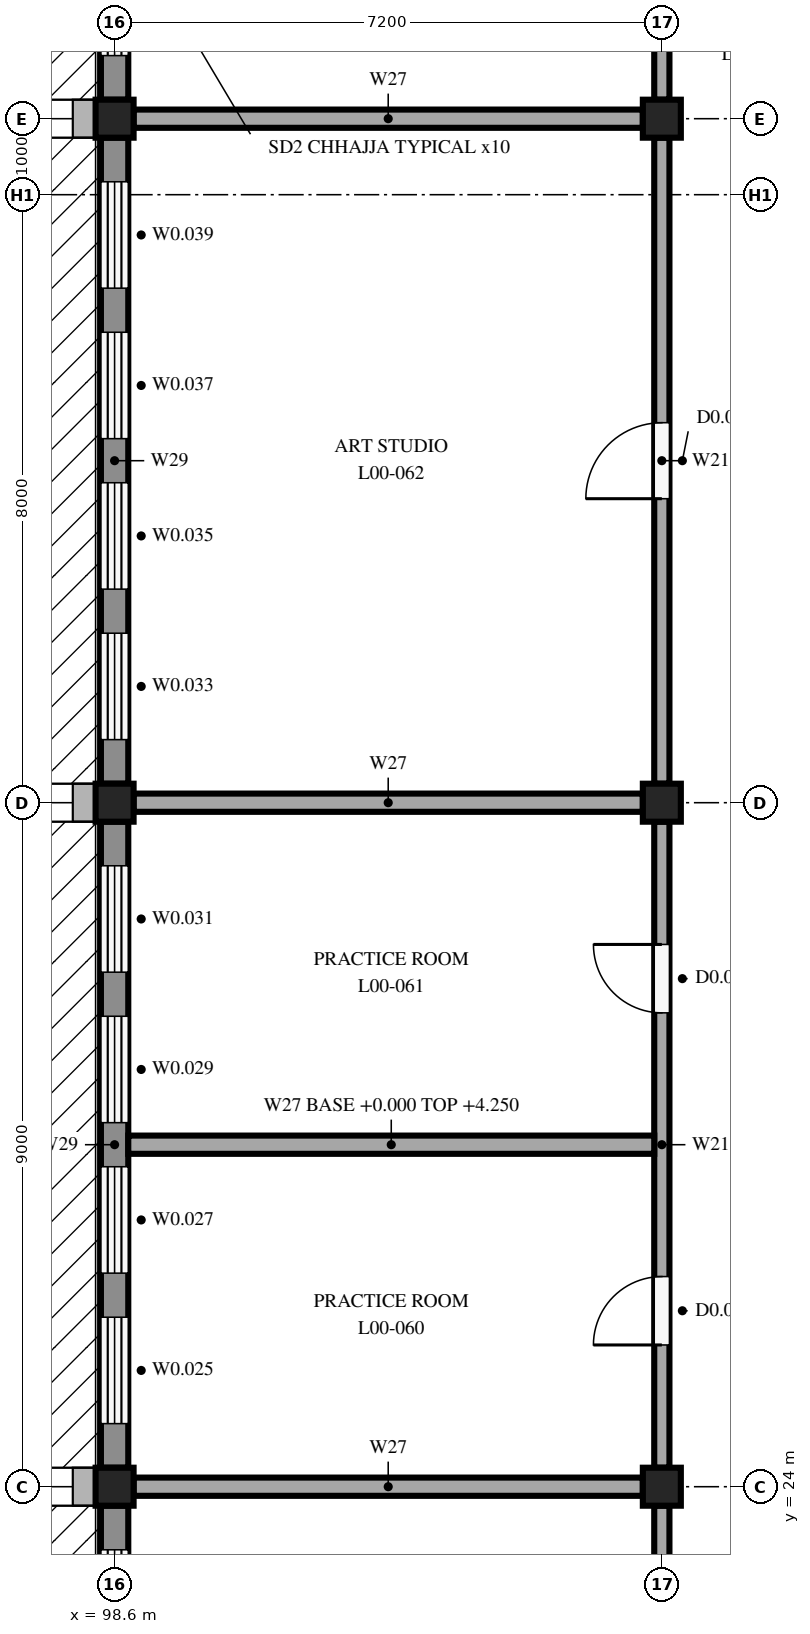
"""IFC4 building model, lengths in metres.
Left out: names, types, materials, properties, quantities, classifications, styles, units other than length and angle.
Written with IfcOpenShell. Run it as: python <this file> out.ifc"""

import sys

from ifc_helpers import new_model, si_unit, direction, frame, frame_2d, origin, origin_2d, place, context, subcontext, project, spatial, rectangle, extrude, element, fill, save


model = new_model("IFC4")
c1 = context("Model", 3, precision=1e-05, world=origin(), true_north=direction((0.0, 1.0)))
c2 = subcontext(c1, "Body", "Model", "MODEL_VIEW")
j1 = project(units=[si_unit("LENGTHUNIT", "METRE"), si_unit("PLANEANGLEUNIT", "RADIAN")], contexts=[c1])
p1 = place(None, origin())
s1 = spatial("IfcSite", under=j1, at=p1, CompositionType="ELEMENT")
p2 = place(p1, origin())
s2 = spatial("IfcBuilding", under=s1, at=p2, CompositionType="ELEMENT")
p3 = place(p2, origin())
s3 = spatial("IfcBuildingStorey", under=s2, at=p3, CompositionType="ELEMENT", Elevation=0.0)
for number, where, z_axis, x_axis in (
    (1, (98.6, 24.0, 0.0), (0.0, 0.0, 1.0), (1.0, 0.0, 0.0)),
    (2, (98.6, 33.0, 0.0), (0.0, 0.0, 1.0), (1.0, 0.0, 0.0)),
    (3, (98.6, 42.0, 0.0), (0.0, 0.0, 1.0), (1.0, 0.0, 0.0)),
    (4, (105.8, 24.0, 0.0), (0.0, 0.0, 1.0), (1.0, 0.0, 0.0)),
    (5, (105.8, 33.0, 0.0), (0.0, 0.0, 1.0), (1.0, 0.0, 0.0)),
    (6, (105.8, 42.0, 0.0), (0.0, 0.0, 1.0), (1.0, 0.0, 0.0)),
):
    element("IfcColumn", number, at=place(p3, frame(where, z_axis=z_axis, x_axis=x_axis)), inside=s3, PredefinedType="COLUMN", context=c2, shape_type="SweptSolid", body=[
        extrude(rectangle(XDim=0.5, YDim=0.5, at=origin_2d()), origin(), (0.0, 0.0, 1.0), 4.25),
    ])
p4 = place(p3, frame((98.6, 15.25, 0.0), z_axis=(0.0, 0.0, 1.0), x_axis=(0.0, 1.0, 0.0)))
e7 = element("IfcWall", 7, at=p4, inside=s3, PredefinedType="STANDARD", context=c2, shape_type="SweptSolid", body=[
    extrude(rectangle(XDim=8.5, YDim=0.36, at=frame_2d((4.25, 0.0))), origin(), (0.0, 0.0, 1.0), 3.75),
])
p5 = place(p4, frame((0.58, 0.0, 1.2)))
e8 = element("IfcOpeningElement", 8, at=p5, cuts=e7, PredefinedType="OPENING", context=c2, shape_type="SweptSolid", body=[
    extrude(rectangle(XDim=1.4, YDim=2.4, at=frame_2d((0.7, 1.2))), frame((0.0, 0.19, 0.0), z_axis=(0.0, -1.0, 0.0), x_axis=(1.0, 0.0, 0.0)), (0.0, 0.0, 1.0), 0.38),
])
p6 = place(p4, frame((2.56, 0.0, 1.2)))
e9 = element("IfcOpeningElement", 9, at=p6, cuts=e7, PredefinedType="OPENING", context=c2, shape_type="SweptSolid", body=[
    extrude(rectangle(XDim=1.4, YDim=2.4, at=frame_2d((0.7, 1.2))), frame((0.0, 0.19, 0.0), z_axis=(0.0, -1.0, 0.0), x_axis=(1.0, 0.0, 0.0)), (0.0, 0.0, 1.0), 0.38),
])
p7 = place(p4, frame((4.54, 0.0, 1.2)))
e10 = element("IfcOpeningElement", 10, at=p7, cuts=e7, PredefinedType="OPENING", context=c2, shape_type="SweptSolid", body=[
    extrude(rectangle(XDim=1.4, YDim=2.4, at=frame_2d((0.7, 1.2))), frame((0.0, 0.19, 0.0), z_axis=(0.0, -1.0, 0.0), x_axis=(1.0, 0.0, 0.0)), (0.0, 0.0, 1.0), 0.38),
])
p8 = place(p4, frame((6.52, 0.0, 1.2)))
e11 = element("IfcOpeningElement", 11, at=p8, cuts=e7, PredefinedType="OPENING", context=c2, shape_type="SweptSolid", body=[
    extrude(rectangle(XDim=1.4, YDim=2.4, at=frame_2d((0.7, 1.2))), frame((0.0, 0.19, 0.0), z_axis=(0.0, -1.0, 0.0), x_axis=(1.0, 0.0, 0.0)), (0.0, 0.0, 1.0), 0.38),
])
p9 = place(p3, frame((98.6, 24.25, 0.0), z_axis=(0.0, 0.0, 1.0), x_axis=(0.0, 1.0, 0.0)))
e12 = element("IfcWall", 12, at=p9, inside=s3, PredefinedType="STANDARD", context=c2, shape_type="SweptSolid", body=[
    extrude(rectangle(XDim=8.5, YDim=0.36, at=frame_2d((4.25, 0.0))), origin(), (0.0, 0.0, 1.0), 3.75),
])
p10 = place(p9, frame((0.58, 0.0, 1.2)))
e13 = element("IfcOpeningElement", 13, at=p10, cuts=e12, PredefinedType="OPENING", context=c2, shape_type="SweptSolid", body=[
    extrude(rectangle(XDim=1.4, YDim=2.4, at=frame_2d((0.7, 1.2))), frame((0.0, 0.19, 0.0), z_axis=(0.0, -1.0, 0.0), x_axis=(1.0, 0.0, 0.0)), (0.0, 0.0, 1.0), 0.38),
])
p11 = place(p9, frame((2.56, 0.0, 1.2)))
e14 = element("IfcOpeningElement", 14, at=p11, cuts=e12, PredefinedType="OPENING", context=c2, shape_type="SweptSolid", body=[
    extrude(rectangle(XDim=1.4, YDim=2.4, at=frame_2d((0.7, 1.2))), frame((0.0, 0.19, 0.0), z_axis=(0.0, -1.0, 0.0), x_axis=(1.0, 0.0, 0.0)), (0.0, 0.0, 1.0), 0.38),
])
p12 = place(p9, frame((4.54, 0.0, 1.2)))
e15 = element("IfcOpeningElement", 15, at=p12, cuts=e12, PredefinedType="OPENING", context=c2, shape_type="SweptSolid", body=[
    extrude(rectangle(XDim=1.4, YDim=2.4, at=frame_2d((0.7, 1.2))), frame((0.0, 0.19, 0.0), z_axis=(0.0, -1.0, 0.0), x_axis=(1.0, 0.0, 0.0)), (0.0, 0.0, 1.0), 0.38),
])
p13 = place(p9, frame((6.52, 0.0, 1.2)))
e16 = element("IfcOpeningElement", 16, at=p13, cuts=e12, PredefinedType="OPENING", context=c2, shape_type="SweptSolid", body=[
    extrude(rectangle(XDim=1.4, YDim=2.4, at=frame_2d((0.7, 1.2))), frame((0.0, 0.19, 0.0), z_axis=(0.0, -1.0, 0.0), x_axis=(1.0, 0.0, 0.0)), (0.0, 0.0, 1.0), 0.38),
])
p14 = place(p3, frame((98.6, 33.25, 0.0), z_axis=(0.0, 0.0, 1.0), x_axis=(0.0, 1.0, 0.0)))
e17 = element("IfcWall", 17, at=p14, inside=s3, PredefinedType="STANDARD", context=c2, shape_type="SweptSolid", body=[
    extrude(rectangle(XDim=8.5, YDim=0.36, at=frame_2d((4.25, 0.0))), origin(), (0.0, 0.0, 1.0), 3.75),
])
p15 = place(p14, frame((0.58, 0.0, 1.2)))
e18 = element("IfcOpeningElement", 18, at=p15, cuts=e17, PredefinedType="OPENING", context=c2, shape_type="SweptSolid", body=[
    extrude(rectangle(XDim=1.4, YDim=2.4, at=frame_2d((0.7, 1.2))), frame((0.0, 0.19, 0.0), z_axis=(0.0, -1.0, 0.0), x_axis=(1.0, 0.0, 0.0)), (0.0, 0.0, 1.0), 0.38),
])
p16 = place(p14, frame((2.56, 0.0, 1.2)))
e19 = element("IfcOpeningElement", 19, at=p16, cuts=e17, PredefinedType="OPENING", context=c2, shape_type="SweptSolid", body=[
    extrude(rectangle(XDim=1.4, YDim=2.4, at=frame_2d((0.7, 1.2))), frame((0.0, 0.19, 0.0), z_axis=(0.0, -1.0, 0.0), x_axis=(1.0, 0.0, 0.0)), (0.0, 0.0, 1.0), 0.38),
])
p17 = place(p14, frame((4.54, 0.0, 1.2)))
e20 = element("IfcOpeningElement", 20, at=p17, cuts=e17, PredefinedType="OPENING", context=c2, shape_type="SweptSolid", body=[
    extrude(rectangle(XDim=1.4, YDim=2.4, at=frame_2d((0.7, 1.2))), frame((0.0, 0.19, 0.0), z_axis=(0.0, -1.0, 0.0), x_axis=(1.0, 0.0, 0.0)), (0.0, 0.0, 1.0), 0.38),
])
p18 = place(p14, frame((6.52, 0.0, 1.2)))
e21 = element("IfcOpeningElement", 21, at=p18, cuts=e17, PredefinedType="OPENING", context=c2, shape_type="SweptSolid", body=[
    extrude(rectangle(XDim=1.4, YDim=2.4, at=frame_2d((0.7, 1.2))), frame((0.0, 0.19, 0.0), z_axis=(0.0, -1.0, 0.0), x_axis=(1.0, 0.0, 0.0)), (0.0, 0.0, 1.0), 0.38),
])
p19 = place(p3, frame((98.6, 42.25, 0.0), z_axis=(0.0, 0.0, 1.0), x_axis=(0.0, 1.0, 0.0)))
e22 = element("IfcWall", 22, at=p19, inside=s3, PredefinedType="STANDARD", context=c2, shape_type="SweptSolid", body=[
    extrude(rectangle(XDim=8.5, YDim=0.36, at=frame_2d((4.25, 0.0))), origin(), (0.0, 0.0, 1.0), 3.75),
])
p20 = place(p19, frame((0.58, 0.0, 1.2)))
e23 = element("IfcOpeningElement", 23, at=p20, cuts=e22, PredefinedType="OPENING", context=c2, shape_type="SweptSolid", body=[
    extrude(rectangle(XDim=1.4, YDim=2.4, at=frame_2d((0.7, 1.2))), frame((0.0, 0.19, 0.0), z_axis=(0.0, -1.0, 0.0), x_axis=(1.0, 0.0, 0.0)), (0.0, 0.0, 1.0), 0.38),
])
p21 = place(p19, frame((2.56, 0.0, 1.2)))
e24 = element("IfcOpeningElement", 24, at=p21, cuts=e22, PredefinedType="OPENING", context=c2, shape_type="SweptSolid", body=[
    extrude(rectangle(XDim=1.4, YDim=2.4, at=frame_2d((0.7, 1.2))), frame((0.0, 0.19, 0.0), z_axis=(0.0, -1.0, 0.0), x_axis=(1.0, 0.0, 0.0)), (0.0, 0.0, 1.0), 0.38),
])
p22 = place(p19, frame((4.54, 0.0, 1.2)))
e25 = element("IfcOpeningElement", 25, at=p22, cuts=e22, PredefinedType="OPENING", context=c2, shape_type="SweptSolid", body=[
    extrude(rectangle(XDim=1.4, YDim=2.4, at=frame_2d((0.7, 1.2))), frame((0.0, 0.19, 0.0), z_axis=(0.0, -1.0, 0.0), x_axis=(1.0, 0.0, 0.0)), (0.0, 0.0, 1.0), 0.38),
])
p23 = place(p19, frame((6.52, 0.0, 1.2)))
e26 = element("IfcOpeningElement", 26, at=p23, cuts=e22, PredefinedType="OPENING", context=c2, shape_type="SweptSolid", body=[
    extrude(rectangle(XDim=1.4, YDim=2.4, at=frame_2d((0.7, 1.2))), frame((0.0, 0.19, 0.0), z_axis=(0.0, -1.0, 0.0), x_axis=(1.0, 0.0, 0.0)), (0.0, 0.0, 1.0), 0.38),
])
p24 = place(p3, frame((105.8, 15.25, 0.0), z_axis=(0.0, 0.0, 1.0), x_axis=(0.0, 1.0, 0.0)))
e27 = element("IfcWall", 27, at=p24, inside=s3, PredefinedType="PARTITIONING", context=c2, shape_type="SweptSolid", body=[
    extrude(rectangle(XDim=8.5, YDim=0.2, at=frame_2d((4.25, 0.0))), origin(), (0.0, 0.0, 1.0), 3.8),
])
p25 = place(p24, frame((3.75, 0.0, 0.0)))
e28 = element("IfcOpeningElement", 28, at=p25, cuts=e27, PredefinedType="OPENING", context=c2, shape_type="SweptSolid", body=[
    extrude(rectangle(XDim=1.0, YDim=2.1, at=frame_2d((0.5, 1.05))), frame((0.0, 0.11, 0.0), z_axis=(0.0, -1.0, 0.0), x_axis=(1.0, 0.0, 0.0)), (0.0, 0.0, 1.0), 0.22),
])
p26 = place(p3, frame((105.8, 24.25, 0.0), z_axis=(0.0, 0.0, 1.0), x_axis=(0.0, 1.0, 0.0)))
e29 = element("IfcWall", 29, at=p26, inside=s3, PredefinedType="PARTITIONING", context=c2, shape_type="SweptSolid", body=[
    extrude(rectangle(XDim=8.5, YDim=0.2, at=frame_2d((4.25, 0.0))), origin(), (0.0, 0.0, 1.0), 3.8),
])
p27 = place(p26, frame((1.615, 0.0, 0.0)))
e30 = element("IfcOpeningElement", 30, at=p27, cuts=e29, PredefinedType="OPENING", context=c2, shape_type="SweptSolid", body=[
    extrude(rectangle(XDim=0.9, YDim=2.1, at=frame_2d((0.45, 1.05))), frame((0.0, 0.11, 0.0), z_axis=(0.0, -1.0, 0.0), x_axis=(1.0, 0.0, 0.0)), (0.0, 0.0, 1.0), 0.22),
])
p28 = place(p26, frame((5.985, 0.0, 0.0)))
e31 = element("IfcOpeningElement", 31, at=p28, cuts=e29, PredefinedType="OPENING", context=c2, shape_type="SweptSolid", body=[
    extrude(rectangle(XDim=0.9, YDim=2.1, at=frame_2d((0.45, 1.05))), frame((0.0, 0.11, 0.0), z_axis=(0.0, -1.0, 0.0), x_axis=(1.0, 0.0, 0.0)), (0.0, 0.0, 1.0), 0.22),
])
p29 = place(p3, frame((105.8, 33.25, 0.0), z_axis=(0.0, 0.0, 1.0), x_axis=(0.0, 1.0, 0.0)))
e32 = element("IfcWall", 32, at=p29, inside=s3, PredefinedType="PARTITIONING", context=c2, shape_type="SweptSolid", body=[
    extrude(rectangle(XDim=8.5, YDim=0.2, at=frame_2d((4.25, 0.0))), origin(), (0.0, 0.0, 1.0), 3.8),
])
p30 = place(p29, frame((3.75, 0.0, 0.0)))
e33 = element("IfcOpeningElement", 33, at=p30, cuts=e32, PredefinedType="OPENING", context=c2, shape_type="SweptSolid", body=[
    extrude(rectangle(XDim=1.0, YDim=2.1, at=frame_2d((0.5, 1.05))), frame((0.0, 0.11, 0.0), z_axis=(0.0, -1.0, 0.0), x_axis=(1.0, 0.0, 0.0)), (0.0, 0.0, 1.0), 0.22),
])
p31 = place(p3, frame((105.8, 42.25, 0.0), z_axis=(0.0, 0.0, 1.0), x_axis=(0.0, 1.0, 0.0)))
e34 = element("IfcWall", 34, at=p31, inside=s3, PredefinedType="PARTITIONING", context=c2, shape_type="SweptSolid", body=[
    extrude(rectangle(XDim=8.5, YDim=0.2, at=frame_2d((4.25, 0.0))), origin(), (0.0, 0.0, 1.0), 3.8),
])
p32 = place(p31, frame((3.75, 0.0, 0.0)))
e35 = element("IfcOpeningElement", 35, at=p32, cuts=e34, PredefinedType="OPENING", context=c2, shape_type="SweptSolid", body=[
    extrude(rectangle(XDim=1.0, YDim=2.1, at=frame_2d((0.5, 1.05))), frame((0.0, 0.11, 0.0), z_axis=(0.0, -1.0, 0.0), x_axis=(1.0, 0.0, 0.0)), (0.0, 0.0, 1.0), 0.22),
])
p33 = place(p3, frame((98.85, 24.0, 0.0), z_axis=(0.0, 0.0, 1.0), x_axis=(1.0, 0.0, 0.0)))
e36 = element("IfcWall", 36, at=p33, inside=s3, PredefinedType="PARTITIONING", context=c2, shape_type="SweptSolid", body=[
    extrude(rectangle(XDim=6.7, YDim=0.24, at=frame_2d((3.35, 0.0))), origin(), (0.0, 0.0, 1.0), 3.8),
])
p34 = place(p3, frame((98.78, 28.5, 0.0), z_axis=(0.0, 0.0, 1.0), x_axis=(1.0, 0.0, 0.0)))
e37 = element("IfcWall", 37, at=p34, inside=s3, PredefinedType="PARTITIONING", context=c2, shape_type="SweptSolid", body=[
    extrude(rectangle(XDim=6.92, YDim=0.24, at=frame_2d((3.46, 0.0))), origin(), (0.0, 0.0, 1.0), 4.25),
])
for number, where, z_axis, x_axis in (
    (38, (98.85, 33.0, 0.0), (0.0, 0.0, 1.0), (1.0, 0.0, 0.0)),
    (39, (98.85, 42.0, 0.0), (0.0, 0.0, 1.0), (1.0, 0.0, 0.0)),
):
    element("IfcWall", number, at=place(p3, frame(where, z_axis=z_axis, x_axis=x_axis)), inside=s3, PredefinedType="PARTITIONING", context=c2, shape_type="SweptSolid", body=[
        extrude(rectangle(XDim=6.7, YDim=0.24, at=frame_2d((3.35, 0.0))), origin(), (0.0, 0.0, 1.0), 3.8),
    ])
p35 = place(p8, origin())
e40 = element("IfcWindow", 40, at=p35, inside=s3, PartitioningType="DOUBLE_PANEL_VERTICAL", PredefinedType="WINDOW", context=c2, shape_type="SweptSolid", body=[
    extrude(rectangle(XDim=1.4, YDim=2.4, at=frame_2d((0.7, 1.2))), frame((0.0, 0.03, 0.0), z_axis=(0.0, -1.0, 0.0), x_axis=(1.0, 0.0, 0.0)), (0.0, 0.0, 1.0), 0.06),
])
fill(e11, e40)
p36 = place(p10, origin())
e41 = element("IfcWindow", 41, at=p36, inside=s3, PartitioningType="DOUBLE_PANEL_VERTICAL", PredefinedType="WINDOW", context=c2, shape_type="SweptSolid", body=[
    extrude(rectangle(XDim=1.4, YDim=2.4, at=frame_2d((0.7, 1.2))), frame((0.0, 0.03, 0.0), z_axis=(0.0, -1.0, 0.0), x_axis=(1.0, 0.0, 0.0)), (0.0, 0.0, 1.0), 0.06),
])
fill(e13, e41)
p37 = place(p11, origin())
e42 = element("IfcWindow", 42, at=p37, inside=s3, PartitioningType="DOUBLE_PANEL_VERTICAL", PredefinedType="WINDOW", context=c2, shape_type="SweptSolid", body=[
    extrude(rectangle(XDim=1.4, YDim=2.4, at=frame_2d((0.7, 1.2))), frame((0.0, 0.03, 0.0), z_axis=(0.0, -1.0, 0.0), x_axis=(1.0, 0.0, 0.0)), (0.0, 0.0, 1.0), 0.06),
])
fill(e14, e42)
p38 = place(p12, origin())
e43 = element("IfcWindow", 43, at=p38, inside=s3, PartitioningType="DOUBLE_PANEL_VERTICAL", PredefinedType="WINDOW", context=c2, shape_type="SweptSolid", body=[
    extrude(rectangle(XDim=1.4, YDim=2.4, at=frame_2d((0.7, 1.2))), frame((0.0, 0.03, 0.0), z_axis=(0.0, -1.0, 0.0), x_axis=(1.0, 0.0, 0.0)), (0.0, 0.0, 1.0), 0.06),
])
fill(e15, e43)
p39 = place(p13, origin())
e44 = element("IfcWindow", 44, at=p39, inside=s3, PartitioningType="DOUBLE_PANEL_VERTICAL", PredefinedType="WINDOW", context=c2, shape_type="SweptSolid", body=[
    extrude(rectangle(XDim=1.4, YDim=2.4, at=frame_2d((0.7, 1.2))), frame((0.0, 0.03, 0.0), z_axis=(0.0, -1.0, 0.0), x_axis=(1.0, 0.0, 0.0)), (0.0, 0.0, 1.0), 0.06),
])
fill(e16, e44)
p40 = place(p15, origin())
e45 = element("IfcWindow", 45, at=p40, inside=s3, PartitioningType="DOUBLE_PANEL_VERTICAL", PredefinedType="WINDOW", context=c2, shape_type="SweptSolid", body=[
    extrude(rectangle(XDim=1.4, YDim=2.4, at=frame_2d((0.7, 1.2))), frame((0.0, 0.03, 0.0), z_axis=(0.0, -1.0, 0.0), x_axis=(1.0, 0.0, 0.0)), (0.0, 0.0, 1.0), 0.06),
])
fill(e18, e45)
p41 = place(p16, origin())
e46 = element("IfcWindow", 46, at=p41, inside=s3, PartitioningType="DOUBLE_PANEL_VERTICAL", PredefinedType="WINDOW", context=c2, shape_type="SweptSolid", body=[
    extrude(rectangle(XDim=1.4, YDim=2.4, at=frame_2d((0.7, 1.2))), frame((0.0, 0.03, 0.0), z_axis=(0.0, -1.0, 0.0), x_axis=(1.0, 0.0, 0.0)), (0.0, 0.0, 1.0), 0.06),
])
fill(e19, e46)
p42 = place(p17, origin())
e47 = element("IfcWindow", 47, at=p42, inside=s3, PartitioningType="DOUBLE_PANEL_VERTICAL", PredefinedType="WINDOW", context=c2, shape_type="SweptSolid", body=[
    extrude(rectangle(XDim=1.4, YDim=2.4, at=frame_2d((0.7, 1.2))), frame((0.0, 0.03, 0.0), z_axis=(0.0, -1.0, 0.0), x_axis=(1.0, 0.0, 0.0)), (0.0, 0.0, 1.0), 0.06),
])
fill(e20, e47)
p43 = place(p18, origin())
e48 = element("IfcWindow", 48, at=p43, inside=s3, PartitioningType="DOUBLE_PANEL_VERTICAL", PredefinedType="WINDOW", context=c2, shape_type="SweptSolid", body=[
    extrude(rectangle(XDim=1.4, YDim=2.4, at=frame_2d((0.7, 1.2))), frame((0.0, 0.03, 0.0), z_axis=(0.0, -1.0, 0.0), x_axis=(1.0, 0.0, 0.0)), (0.0, 0.0, 1.0), 0.06),
])
fill(e21, e48)
p44 = place(p20, origin())
e49 = element("IfcWindow", 49, at=p44, inside=s3, PartitioningType="DOUBLE_PANEL_VERTICAL", PredefinedType="WINDOW", context=c2, shape_type="SweptSolid", body=[
    extrude(rectangle(XDim=1.4, YDim=2.4, at=frame_2d((0.7, 1.2))), frame((0.0, 0.03, 0.0), z_axis=(0.0, -1.0, 0.0), x_axis=(1.0, 0.0, 0.0)), (0.0, 0.0, 1.0), 0.06),
])
fill(e23, e49)
p45 = place(p27, origin())
e50 = element("IfcDoor", 50, at=p45, inside=s3, OperationType="SINGLE_SWING_LEFT", PredefinedType="DOOR", context=c2, shape_type="SweptSolid", body=[
    extrude(rectangle(XDim=0.9, YDim=2.1, at=frame_2d((0.45, 1.05))), frame((0.0, 0.025, 0.0), z_axis=(0.0, -1.0, 0.0), x_axis=(1.0, 0.0, 0.0)), (0.0, 0.0, 1.0), 0.05),
])
fill(e30, e50)
p46 = place(p28, origin())
e51 = element("IfcDoor", 51, at=p46, inside=s3, OperationType="SINGLE_SWING_RIGHT", PredefinedType="DOOR", context=c2, shape_type="SweptSolid", body=[
    extrude(rectangle(XDim=0.9, YDim=2.1, at=frame_2d((0.45, 1.05))), frame((0.0, 0.025, 0.0), z_axis=(0.0, -1.0, 0.0), x_axis=(1.0, 0.0, 0.0)), (0.0, 0.0, 1.0), 0.05),
])
fill(e31, e51)
p47 = place(p30, origin())
e52 = element("IfcDoor", 52, at=p47, inside=s3, OperationType="SINGLE_SWING_LEFT", PredefinedType="DOOR", context=c2, shape_type="SweptSolid", body=[
    extrude(rectangle(XDim=1.0, YDim=2.1, at=frame_2d((0.5, 1.05))), frame((0.0, 0.025, 0.0), z_axis=(0.0, -1.0, 0.0), x_axis=(1.0, 0.0, 0.0)), (0.0, 0.0, 1.0), 0.05),
])
fill(e33, e52)
save(model, sys.argv[1])
